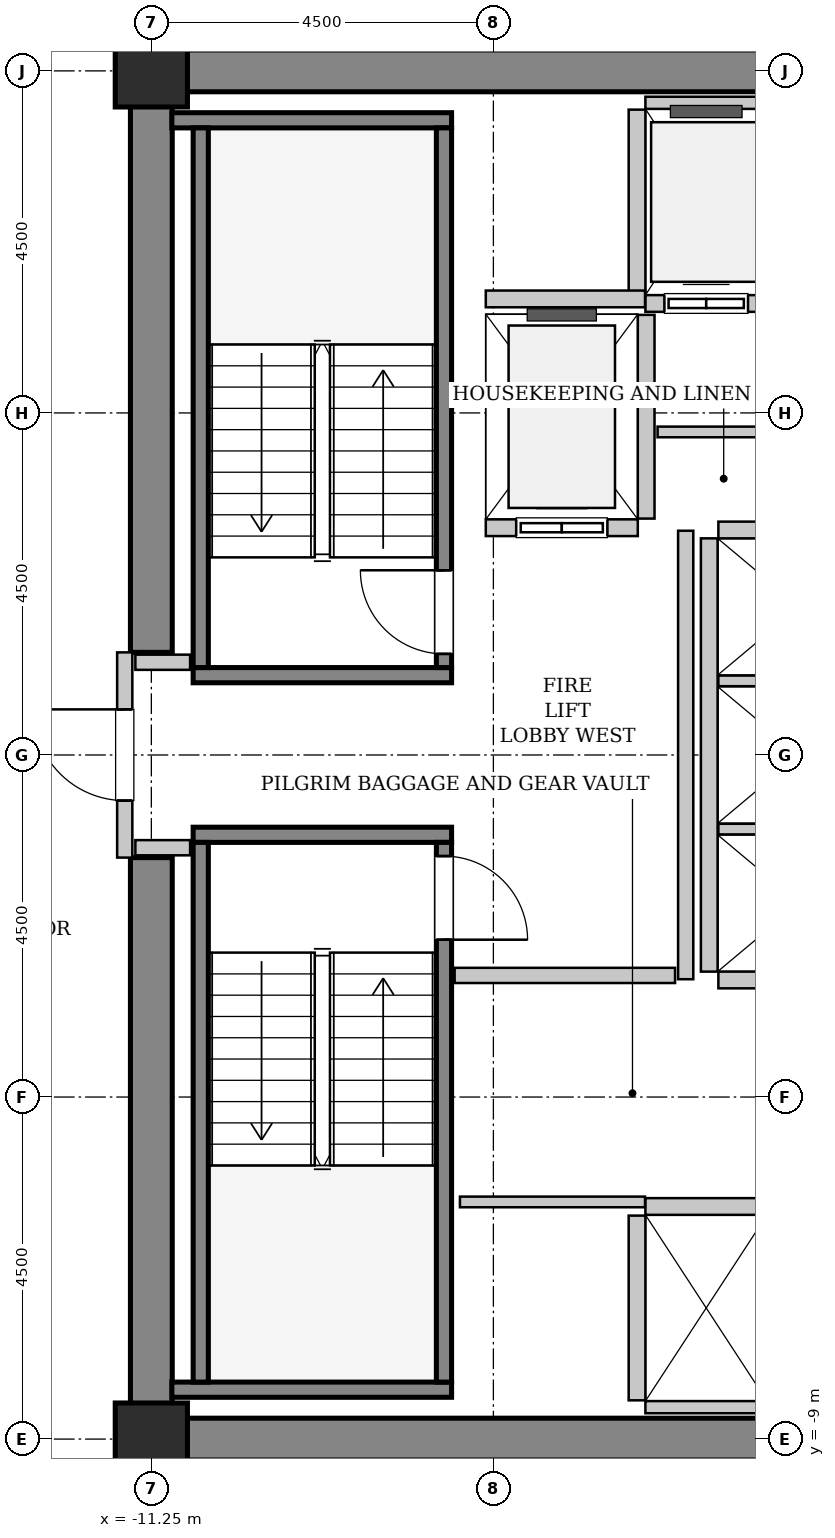
"""IFC4 building model, lengths in metres.
Left out: names, types, materials, properties, quantities, classifications, styles, units other than length and angle.
Written with IfcOpenShell. Run it as: python <this file> out.ifc"""

import sys

from ifc_helpers import new_model, si_unit, direction, frame, frame_2d, origin, origin_2d, place, context, subcontext, project, spatial, rectangle, hollow_rectangle, extrude, source, transform, mapped, element, fill, save


model = new_model("IFC4")
c1 = context("Model", 3, precision=1e-05, world=origin(), true_north=direction((0.0, 1.0)))
c2 = subcontext(c1, "Body", "Model", "MODEL_VIEW")
j1 = project(units=[si_unit("LENGTHUNIT", "METRE"), si_unit("PLANEANGLEUNIT", "RADIAN")], contexts=[c1])
p1 = place(None, origin())
s1 = spatial("IfcSite", under=j1, at=p1, CompositionType="ELEMENT")
p2 = place(p1, origin())
s2 = spatial("IfcBuilding", under=s1, at=p2, CompositionType="ELEMENT")
p3 = place(p2, frame((0.0, 0.0, 117.4)))
s3 = spatial("IfcBuildingStorey", under=s2, at=p3, CompositionType="ELEMENT", Elevation=117.4)
m1 = source(origin(), c2, "Body", "SweptSolid", [
    extrude(rectangle(XDim=9.975, YDim=0.55, at=frame_2d((4.987, 0.0))), origin(), (0.0, 0.0, 1.0), 3.8),
])
for number, where, z_axis, x_axis in (
    (1, (-11.525, 9.0, 0.0), (0.0, 0.0, 1.0), (1.0, 0.0, 0.0)),
    (2, (-11.525, -9.0, 0.0), (0.0, 0.0, 1.0), (1.0, 0.0, 0.0)),
):
    element("IfcWall", number, at=place(p3, frame(where, z_axis=z_axis, x_axis=x_axis)), inside=s3, PredefinedType="SHEAR", context=c2, shape_type="MappedRepresentation", body=[
        mapped(m1, transform((0.0, 0.0, 0.0), x_axis=(1.0, 0.0, 0.0), y_axis=(0.0, 1.0, 0.0), z_axis=(0.0, 0.0, 1.0), scale=1.0)),
    ])
m2 = source(origin(), c2, "Body", "SweptSolid", [
    extrude(rectangle(XDim=7.375, YDim=0.55, at=frame_2d((3.688, 0.0))), origin(), (0.0, 0.0, 1.0), 3.8),
])
for number, where, z_axis, x_axis in (
    (3, (-11.25, -8.725, 0.0), (0.0, 0.0, 1.0), (0.0, 1.0, 0.0)),
    (4, (-11.25, 1.35, 0.0), (0.0, 0.0, 1.0), (0.0, 1.0, 0.0)),
):
    element("IfcWall", number, at=place(p3, frame(where, z_axis=z_axis, x_axis=x_axis)), inside=s3, PredefinedType="SHEAR", context=c2, shape_type="MappedRepresentation", body=[
        mapped(m2, transform((0.0, 0.0, 0.0), x_axis=(1.0, 0.0, 0.0), y_axis=(0.0, 1.0, 0.0), z_axis=(0.0, 0.0, 1.0), scale=1.0)),
    ])
m3 = source(origin(), c2, "Body", "SweptSolid", [
    extrude(hollow_rectangle(XDim=0.95, YDim=0.95, WallThickness=0.045, InnerFilletRadius=0.045, OuterFilletRadius=0.09, at=origin_2d()), origin(), (0.0, 0.0, 1.0), 3.8),
])
for number, where, z_axis, x_axis in (
    (5, (-11.25, -9.0, 0.0), (0.0, 0.0, 1.0), (1.0, 0.0, 0.0)),
    (6, (-11.25, 9.0, 0.0), (0.0, 0.0, 1.0), (1.0, 0.0, 0.0)),
):
    element("IfcColumn", number, at=place(p3, frame(where, z_axis=z_axis, x_axis=x_axis)), inside=s3, PredefinedType="COLUMN", context=c2, shape_type="MappedRepresentation", body=[
        mapped(m3, transform((0.0, 0.0, 0.0), x_axis=(1.0, 0.0, 0.0), y_axis=(0.0, 1.0, 0.0), z_axis=(0.0, 0.0, 1.0), scale=1.0)),
    ])
m4 = source(origin(), c2, "Body", "SweptSolid", [
    extrude(rectangle(XDim=3.4, YDim=0.2, at=frame_2d((1.7, 0.0))), origin(), (0.0, 0.0, 1.0), 3.8),
])
p4 = place(p3, frame((-7.3, 1.05, 0.0), z_axis=(0.0, 0.0, 1.0), x_axis=(-1.0, 0.0, 0.0)))
e7 = element("IfcWall", 7, at=p4, inside=s3, PredefinedType="SOLIDWALL", context=c2, shape_type="MappedRepresentation", body=[
    mapped(m4, transform((0.0, 0.0, 0.0), x_axis=(1.0, 0.0, 0.0), y_axis=(0.0, 1.0, 0.0), z_axis=(0.0, 0.0, 1.0), scale=1.0)),
])
m5 = source(origin(), c2, "Body", "SweptSolid", [
    extrude(rectangle(XDim=3.68, YDim=0.2, at=frame_2d((1.84, 0.0))), origin(), (0.0, 0.0, 1.0), 3.8),
])
p5 = place(p3, frame((-7.3, 8.35, 0.0), z_axis=(0.0, 0.0, 1.0), x_axis=(-1.0, 0.0, 0.0)))
e8 = element("IfcWall", 8, at=p5, inside=s3, PredefinedType="SOLIDWALL", context=c2, shape_type="MappedRepresentation", body=[
    mapped(m5, transform((0.0, 0.0, 0.0), x_axis=(1.0, 0.0, 0.0), y_axis=(0.0, 1.0, 0.0), z_axis=(0.0, 0.0, 1.0), scale=1.0)),
])
m6 = source(origin(), c2, "Body", "SweptSolid", [
    extrude(rectangle(XDim=7.1, YDim=0.2, at=frame_2d((3.55, 0.0))), origin(), (0.0, 0.0, 1.0), 3.8),
])
p6 = place(p3, frame((-7.4, 1.15, 0.0), z_axis=(0.0, 0.0, 1.0), x_axis=(0.0, 1.0, 0.0)))
e9 = element("IfcWall", 9, at=p6, inside=s3, PredefinedType="SOLIDWALL", context=c2, shape_type="MappedRepresentation", body=[
    mapped(m6, transform((0.0, 0.0, 0.0), x_axis=(1.0, 0.0, 0.0), y_axis=(0.0, 1.0, 0.0), z_axis=(0.0, 0.0, 1.0), scale=1.0)),
])
p7 = place(p6, frame((0.18, 0.0, 0.0)))
e10 = element("IfcOpeningElement", 10, at=p7, cuts=e9, PredefinedType="OPENING", context=c2, shape_type="SweptSolid", body=[
    extrude(rectangle(XDim=1.1, YDim=2.15, at=frame_2d((0.55, 1.075))), frame((0.0, 0.11, 0.0), z_axis=(0.0, -1.0, 0.0), x_axis=(1.0, 0.0, 0.0)), (0.0, 0.0, 1.0), 0.22),
])
p8 = place(p3, frame((-10.6, 1.15, 0.0), z_axis=(0.0, 0.0, 1.0), x_axis=(0.0, 1.0, 0.0)))
e11 = element("IfcWall", 11, at=p8, inside=s3, PredefinedType="SOLIDWALL", context=c2, shape_type="MappedRepresentation", body=[
    mapped(m6, transform((0.0, 0.0, 0.0), x_axis=(1.0, 0.0, 0.0), y_axis=(0.0, 1.0, 0.0), z_axis=(0.0, 0.0, 1.0), scale=1.0)),
])
p9 = place(p3, frame((-10.7, -1.05, 0.0), z_axis=(0.0, 0.0, 1.0), x_axis=(1.0, 0.0, 0.0)))
e12 = element("IfcWall", 12, at=p9, inside=s3, PredefinedType="SOLIDWALL", context=c2, shape_type="MappedRepresentation", body=[
    mapped(m4, transform((0.0, 0.0, 0.0), x_axis=(1.0, 0.0, 0.0), y_axis=(0.0, 1.0, 0.0), z_axis=(0.0, 0.0, 1.0), scale=1.0)),
])
p10 = place(p3, frame((-10.98, -8.35, 0.0), z_axis=(0.0, 0.0, 1.0), x_axis=(1.0, 0.0, 0.0)))
e13 = element("IfcWall", 13, at=p10, inside=s3, PredefinedType="SOLIDWALL", context=c2, shape_type="MappedRepresentation", body=[
    mapped(m5, transform((0.0, 0.0, 0.0), x_axis=(1.0, 0.0, 0.0), y_axis=(0.0, 1.0, 0.0), z_axis=(0.0, 0.0, 1.0), scale=1.0)),
])
p11 = place(p3, frame((-10.6, -1.15, 0.0), z_axis=(0.0, 0.0, 1.0), x_axis=(0.0, -1.0, 0.0)))
e14 = element("IfcWall", 14, at=p11, inside=s3, PredefinedType="SOLIDWALL", context=c2, shape_type="MappedRepresentation", body=[
    mapped(m6, transform((0.0, 0.0, 0.0), x_axis=(1.0, 0.0, 0.0), y_axis=(0.0, 1.0, 0.0), z_axis=(0.0, 0.0, 1.0), scale=1.0)),
])
p12 = place(p3, frame((-7.4, -1.15, 0.0), z_axis=(0.0, 0.0, 1.0), x_axis=(0.0, -1.0, 0.0)))
e15 = element("IfcWall", 15, at=p12, inside=s3, PredefinedType="SOLIDWALL", context=c2, shape_type="MappedRepresentation", body=[
    mapped(m6, transform((0.0, 0.0, 0.0), x_axis=(1.0, 0.0, 0.0), y_axis=(0.0, 1.0, 0.0), z_axis=(0.0, 0.0, 1.0), scale=1.0)),
])
p13 = place(p12, frame((0.18, 0.0, 0.0)))
e16 = element("IfcOpeningElement", 16, at=p13, cuts=e15, PredefinedType="OPENING", context=c2, shape_type="SweptSolid", body=[
    extrude(rectangle(XDim=1.1, YDim=2.15, at=frame_2d((0.55, 1.075))), frame((0.0, 0.11, 0.0), z_axis=(0.0, -1.0, 0.0), x_axis=(1.0, 0.0, 0.0)), (0.0, 0.0, 1.0), 0.22),
])
m7 = source(origin(), c2, "Body", "SweptSolid", [
    extrude(rectangle(XDim=2.0, YDim=0.22, at=frame_2d((1.0, 0.0))), origin(), (0.0, 0.0, 1.0), 3.535),
])
p14 = place(p3, frame((-6.85, 2.99, 0.0), z_axis=(0.0, 0.0, 1.0), x_axis=(1.0, 0.0, 0.0)))
e17 = element("IfcWall", 17, at=p14, inside=s3, PredefinedType="SOLIDWALL", context=c2, shape_type="MappedRepresentation", body=[
    mapped(m7, transform((0.0, 0.0, 0.0), x_axis=(1.0, 0.0, 0.0), y_axis=(0.0, 1.0, 0.0), z_axis=(0.0, 0.0, 1.0), scale=1.0)),
])
p15 = place(p14, frame((0.4, 0.0, 0.0)))
e18 = element("IfcOpeningElement", 18, at=p15, cuts=e17, PredefinedType="OPENING", context=c2, shape_type="SweptSolid", body=[
    extrude(rectangle(XDim=1.2, YDim=2.2, at=frame_2d((0.6, 1.1))), frame((0.0, 0.12, 0.0), z_axis=(0.0, -1.0, 0.0), x_axis=(1.0, 0.0, 0.0)), (0.0, 0.0, 1.0), 0.24),
])
m8 = source(origin(), c2, "Body", "SweptSolid", [
    extrude(rectangle(XDim=2.68, YDim=0.22, at=frame_2d((1.34, 0.0))), origin(), (0.0, 0.0, 1.0), 3.535),
])
p16 = place(p3, frame((-4.74, 3.11, 0.0), z_axis=(0.0, 0.0, 1.0), x_axis=(0.0, 1.0, 0.0)))
e19 = element("IfcWall", 19, at=p16, inside=s3, PredefinedType="SOLIDWALL", context=c2, shape_type="MappedRepresentation", body=[
    mapped(m8, transform((0.0, 0.0, 0.0), x_axis=(1.0, 0.0, 0.0), y_axis=(0.0, 1.0, 0.0), z_axis=(0.0, 0.0, 1.0), scale=1.0)),
])
m9 = source(origin(), c2, "Body", "SweptSolid", [
    extrude(rectangle(XDim=3.2, YDim=0.22, at=frame_2d((1.6, 0.0))), origin(), (0.0, 0.0, 1.0), 3.535),
])
p17 = place(p3, frame((-4.75, 5.94, 0.0), z_axis=(0.0, 0.0, 1.0), x_axis=(1.0, 0.0, 0.0)))
e20 = element("IfcWall", 20, at=p17, inside=s3, PredefinedType="SOLIDWALL", context=c2, shape_type="MappedRepresentation", body=[
    mapped(m9, transform((0.0, 0.0, 0.0), x_axis=(1.0, 0.0, 0.0), y_axis=(0.0, 1.0, 0.0), z_axis=(0.0, 0.0, 1.0), scale=1.0)),
])
p18 = place(p17, frame((0.25, 0.0, 0.0)))
e21 = element("IfcOpeningElement", 21, at=p18, cuts=e20, PredefinedType="OPENING", context=c2, shape_type="SweptSolid", body=[
    extrude(rectangle(XDim=1.1, YDim=2.2, at=frame_2d((0.55, 1.1))), frame((0.0, 0.12, 0.0), z_axis=(0.0, -1.0, 0.0), x_axis=(1.0, 0.0, 0.0)), (0.0, 0.0, 1.0), 0.24),
])
p19 = place(p17, frame((1.875, 0.0, 0.0)))
e22 = element("IfcOpeningElement", 22, at=p19, cuts=e20, PredefinedType="OPENING", context=c2, shape_type="SweptSolid", body=[
    extrude(rectangle(XDim=1.1, YDim=2.2, at=frame_2d((0.55, 1.1))), frame((0.0, 0.12, 0.0), z_axis=(0.0, -1.0, 0.0), x_axis=(1.0, 0.0, 0.0)), (0.0, 0.0, 1.0), 0.24),
])
m10 = source(origin(), c2, "Body", "SweptSolid", [
    extrude(rectangle(XDim=3.2, YDim=0.16, at=frame_2d((1.6, 0.0))), origin(), (0.0, 0.0, 1.0), 2.425),
])
p20 = place(p3, frame((-1.55, 8.58, 0.0), z_axis=(0.0, 0.0, 1.0), x_axis=(-1.0, 0.0, 0.0)))
e23 = element("IfcWall", 23, at=p20, inside=s3, PredefinedType="PARTITIONING", context=c2, shape_type="MappedRepresentation", body=[
    mapped(m10, transform((0.0, 0.0, 0.0), x_axis=(1.0, 0.0, 0.0), y_axis=(0.0, 1.0, 0.0), z_axis=(0.0, 0.0, 1.0), scale=1.0)),
])
m11 = source(origin(), c2, "Body", "SweptSolid", [
    extrude(rectangle(XDim=2.43, YDim=0.22, at=frame_2d((1.215, 0.0))), origin(), (0.0, 0.0, 1.0), 3.535),
])
p21 = place(p3, frame((-4.86, 8.49, 0.0), z_axis=(0.0, 0.0, 1.0), x_axis=(0.0, -1.0, 0.0)))
e24 = element("IfcWall", 24, at=p21, inside=s3, PredefinedType="SOLIDWALL", context=c2, shape_type="MappedRepresentation", body=[
    mapped(m11, transform((0.0, 0.0, 0.0), x_axis=(1.0, 0.0, 0.0), y_axis=(0.0, 1.0, 0.0), z_axis=(0.0, 0.0, 1.0), scale=1.0)),
])
p22 = place(p3, frame((-1.55, -5.94, 0.0), z_axis=(0.0, 0.0, 1.0), x_axis=(-1.0, 0.0, 0.0)))
e25 = element("IfcWall", 25, at=p22, inside=s3, PredefinedType="SOLIDWALL", context=c2, shape_type="MappedRepresentation", body=[
    mapped(m9, transform((0.0, 0.0, 0.0), x_axis=(1.0, 0.0, 0.0), y_axis=(0.0, 1.0, 0.0), z_axis=(0.0, 0.0, 1.0), scale=1.0)),
])
p23 = place(p3, frame((-4.75, -8.58, 0.0), z_axis=(0.0, 0.0, 1.0), x_axis=(1.0, 0.0, 0.0)))
e26 = element("IfcWall", 26, at=p23, inside=s3, PredefinedType="PARTITIONING", context=c2, shape_type="MappedRepresentation", body=[
    mapped(m10, transform((0.0, 0.0, 0.0), x_axis=(1.0, 0.0, 0.0), y_axis=(0.0, 1.0, 0.0), z_axis=(0.0, 0.0, 1.0), scale=1.0)),
])
p24 = place(p3, frame((-4.86, -6.06, 0.0), z_axis=(0.0, 0.0, 1.0), x_axis=(0.0, -1.0, 0.0)))
e27 = element("IfcWall", 27, at=p24, inside=s3, PredefinedType="SOLIDWALL", context=c2, shape_type="MappedRepresentation", body=[
    mapped(m11, transform((0.0, 0.0, 0.0), x_axis=(1.0, 0.0, 0.0), y_axis=(0.0, 1.0, 0.0), z_axis=(0.0, 0.0, 1.0), scale=1.0)),
])
m12 = source(origin(), c2, "Body", "SweptSolid", [
    extrude(rectangle(XDim=5.7, YDim=0.22, at=frame_2d((2.85, 0.0))), origin(), (0.0, 0.0, 1.0), 3.535),
])
p25 = place(p3, frame((-3.91, 2.85, 0.0), z_axis=(0.0, 0.0, 1.0), x_axis=(0.0, -1.0, 0.0)))
e28 = element("IfcWall", 28, at=p25, inside=s3, PredefinedType="SOLIDWALL", context=c2, shape_type="MappedRepresentation", body=[
    mapped(m12, transform((0.0, 0.0, 0.0), x_axis=(1.0, 0.0, 0.0), y_axis=(0.0, 1.0, 0.0), z_axis=(0.0, 0.0, 1.0), scale=1.0)),
])
m13 = source(origin(), c2, "Body", "SweptSolid", [
    extrude(rectangle(XDim=2.13, YDim=0.22, at=frame_2d((1.065, 0.0))), origin(), (0.0, 0.0, 1.0), 3.535),
])
p26 = place(p3, frame((-3.79, -2.96, 0.0), z_axis=(0.0, 0.0, 1.0), x_axis=(1.0, 0.0, 0.0)))
e29 = element("IfcWall", 29, at=p26, inside=s3, PredefinedType="SOLIDWALL", context=c2, shape_type="MappedRepresentation", body=[
    mapped(m13, transform((0.0, 0.0, 0.0), x_axis=(1.0, 0.0, 0.0), y_axis=(0.0, 1.0, 0.0), z_axis=(0.0, 0.0, 1.0), scale=1.0)),
])
m14 = source(origin(), c2, "Body", "SweptSolid", [
    extrude(rectangle(XDim=2.13, YDim=0.14, at=frame_2d((1.065, 0.0))), origin(), (0.0, 0.0, 1.0), 3.535),
])
for number, where, z_axis, x_axis in (
    (30, (-3.79, -0.975, 0.0), (0.0, 0.0, 1.0), (1.0, 0.0, 0.0)),
    (31, (-3.79, 0.975, 0.0), (0.0, 0.0, 1.0), (1.0, 0.0, 0.0)),
):
    element("IfcWall", number, at=place(p3, frame(where, z_axis=z_axis, x_axis=x_axis)), inside=s3, PredefinedType="PARTITIONING", context=c2, shape_type="MappedRepresentation", body=[
        mapped(m14, transform((0.0, 0.0, 0.0), x_axis=(1.0, 0.0, 0.0), y_axis=(0.0, 1.0, 0.0), z_axis=(0.0, 0.0, 1.0), scale=1.0)),
    ])
p27 = place(p3, frame((-1.66, 2.96, 0.0), z_axis=(0.0, 0.0, 1.0), x_axis=(-1.0, 0.0, 0.0)))
e32 = element("IfcWall", 32, at=p27, inside=s3, PredefinedType="SOLIDWALL", context=c2, shape_type="MappedRepresentation", body=[
    mapped(m13, transform((0.0, 0.0, 0.0), x_axis=(1.0, 0.0, 0.0), y_axis=(0.0, 1.0, 0.0), z_axis=(0.0, 0.0, 1.0), scale=1.0)),
])
m15 = source(origin(), c2, "Body", "SweptSolid", [
    extrude(rectangle(XDim=2.095, YDim=0.22, at=frame_2d((1.048, 0.0))), origin(), (0.0, 0.0, 1.0), 3.535),
])
p28 = place(p3, frame((-6.85, 6.0, 0.0), z_axis=(0.0, 0.0, 1.0), x_axis=(1.0, 0.0, 0.0)))
e33 = element("IfcWall", 33, at=p28, inside=s3, PredefinedType="SOLIDWALL", context=c2, shape_type="MappedRepresentation", body=[
    mapped(m15, transform((0.0, 0.0, 0.0), x_axis=(1.0, 0.0, 0.0), y_axis=(0.0, 1.0, 0.0), z_axis=(0.0, 0.0, 1.0), scale=1.0)),
])
m16 = source(origin(), c2, "Body", "SweptSolid", [
    extrude(rectangle(XDim=2.7, YDim=0.2, at=frame_2d((1.35, 0.0))), origin(), (0.0, 0.0, 1.0), 2.425),
])
p29 = place(p3, frame((-11.6, -1.35, 0.0), z_axis=(0.0, 0.0, 1.0), x_axis=(0.0, 1.0, 0.0)))
e34 = element("IfcWall", 34, at=p29, inside=s3, PredefinedType="PARTITIONING", context=c2, shape_type="MappedRepresentation", body=[
    mapped(m16, transform((0.0, 0.0, 0.0), x_axis=(1.0, 0.0, 0.0), y_axis=(0.0, 1.0, 0.0), z_axis=(0.0, 0.0, 1.0), scale=1.0)),
])
p30 = place(p29, frame((0.75, 0.0, 0.0)))
e35 = element("IfcOpeningElement", 35, at=p30, cuts=e34, PredefinedType="OPENING", context=c2, shape_type="SweptSolid", body=[
    extrude(rectangle(XDim=1.2, YDim=2.15, at=frame_2d((0.6, 1.075))), frame((0.0, 0.11, 0.0), z_axis=(0.0, -1.0, 0.0), x_axis=(1.0, 0.0, 0.0)), (0.0, 0.0, 1.0), 0.22),
])
m17 = source(origin(), c2, "Body", "SweptSolid", [
    extrude(rectangle(XDim=5.9, YDim=0.2, at=frame_2d((2.95, 0.0))), origin(), (0.0, 0.0, 1.0), 3.535),
])
p31 = place(p3, frame((-4.22, -2.95, 0.0), z_axis=(0.0, 0.0, 1.0), x_axis=(0.0, 1.0, 0.0)))
e36 = element("IfcWall", 36, at=p31, inside=s3, PredefinedType="PARTITIONING", context=c2, shape_type="MappedRepresentation", body=[
    mapped(m17, transform((0.0, 0.0, 0.0), x_axis=(1.0, 0.0, 0.0), y_axis=(0.0, 1.0, 0.0), z_axis=(0.0, 0.0, 1.0), scale=1.0)),
])
m18 = source(origin(), c2, "Body", "SweptSolid", [
    extrude(rectangle(XDim=2.9, YDim=0.2, at=frame_2d((1.45, 0.0))), origin(), (0.0, 0.0, 1.0), 3.535),
])
p32 = place(p3, frame((-7.26, -2.9, 0.0), z_axis=(0.0, 0.0, 1.0), x_axis=(1.0, 0.0, 0.0)))
e37 = element("IfcWall", 37, at=p32, inside=s3, PredefinedType="PARTITIONING", context=c2, shape_type="MappedRepresentation", body=[
    mapped(m18, transform((0.0, 0.0, 0.0), x_axis=(1.0, 0.0, 0.0), y_axis=(0.0, 1.0, 0.0), z_axis=(0.0, 0.0, 1.0), scale=1.0)),
])
m19 = source(origin(), c2, "Body", "SweptSolid", [
    extrude(rectangle(XDim=0.72, YDim=0.2, at=frame_2d((0.36, 0.0))), origin(), (0.0, 0.0, 1.0), 3.535),
])
for number, where, z_axis, x_axis in (
    (38, (-11.46, 1.22, 0.0), (0.0, 0.0, 1.0), (1.0, 0.0, 0.0)),
    (39, (-11.46, -1.22, 0.0), (0.0, 0.0, 1.0), (1.0, 0.0, 0.0)),
):
    element("IfcWall", number, at=place(p3, frame(where, z_axis=z_axis, x_axis=x_axis)), inside=s3, PredefinedType="PARTITIONING", context=c2, shape_type="MappedRepresentation", body=[
        mapped(m19, transform((0.0, 0.0, 0.0), x_axis=(1.0, 0.0, 0.0), y_axis=(0.0, 1.0, 0.0), z_axis=(0.0, 0.0, 1.0), scale=1.0)),
    ])
m20 = source(origin(), c2, "Body", "SweptSolid", [
    extrude(rectangle(XDim=2.95, YDim=0.14, at=frame_2d((1.475, 0.0))), origin(), (0.0, 0.0, 1.0), 3.535),
])
p33 = place(p3, frame((-4.59, 4.25, 0.0), z_axis=(0.0, 0.0, 1.0), x_axis=(1.0, 0.0, 0.0)))
e40 = element("IfcWall", 40, at=p33, inside=s3, PredefinedType="PARTITIONING", context=c2, shape_type="MappedRepresentation", body=[
    mapped(m20, transform((0.0, 0.0, 0.0), x_axis=(1.0, 0.0, 0.0), y_axis=(0.0, 1.0, 0.0), z_axis=(0.0, 0.0, 1.0), scale=1.0)),
])
m21 = source(origin(), c2, "Body", "SweptSolid", [
    extrude(rectangle(XDim=2.435, YDim=0.14, at=frame_2d((1.218, 0.0))), origin(), (0.0, 0.0, 1.0), 3.535),
])
p34 = place(p3, frame((-7.19, -5.88, 0.0), z_axis=(0.0, 0.0, 1.0), x_axis=(1.0, 0.0, 0.0)))
e41 = element("IfcWall", 41, at=p34, inside=s3, PredefinedType="PARTITIONING", context=c2, shape_type="MappedRepresentation", body=[
    mapped(m21, transform((0.0, 0.0, 0.0), x_axis=(1.0, 0.0, 0.0), y_axis=(0.0, 1.0, 0.0), z_axis=(0.0, 0.0, 1.0), scale=1.0)),
])
m22 = source(origin(), c2, "Body", "SweptSolid", [
    extrude(rectangle(XDim=1.1, YDim=2.15, at=frame_2d((0.55, 1.075))), frame((0.0, 0.025, 0.0), z_axis=(0.0, -1.0, 0.0), x_axis=(1.0, 0.0, 0.0)), (0.0, 0.0, 1.0), 0.05),
])
p35 = place(p7, origin())
e42 = element("IfcDoor", 42, at=p35, inside=s3, OperationType="SINGLE_SWING_RIGHT", PredefinedType="DOOR", context=c2, shape_type="MappedRepresentation", body=[
    mapped(m22, transform((0.0, 0.0, 0.0), x_axis=(1.0, 0.0, 0.0), y_axis=(0.0, 1.0, 0.0), z_axis=(0.0, 0.0, 1.0), scale=1.0)),
])
fill(e10, e42)
p36 = place(p13, origin())
e43 = element("IfcDoor", 43, at=p36, inside=s3, OperationType="SINGLE_SWING_RIGHT", PredefinedType="DOOR", context=c2, shape_type="MappedRepresentation", body=[
    mapped(m22, transform((0.0, 0.0, 0.0), x_axis=(1.0, 0.0, 0.0), y_axis=(0.0, 1.0, 0.0), z_axis=(0.0, 0.0, 1.0), scale=1.0)),
])
fill(e16, e43)
m23 = source(origin(), c2, "Body", "SweptSolid", [
    extrude(rectangle(XDim=1.2, YDim=2.2, at=frame_2d((0.6, 1.1))), frame((0.0, 0.025, 0.0), z_axis=(0.0, -1.0, 0.0), x_axis=(1.0, 0.0, 0.0)), (0.0, 0.0, 1.0), 0.05),
])
p37 = place(p15, origin())
e44 = element("IfcDoor", 44, at=p37, inside=s3, OperationType="SLIDING_TO_LEFT", PredefinedType="DOOR", context=c2, shape_type="MappedRepresentation", body=[
    mapped(m23, transform((0.0, 0.0, 0.0), x_axis=(1.0, 0.0, 0.0), y_axis=(0.0, 1.0, 0.0), z_axis=(0.0, 0.0, 1.0), scale=1.0)),
])
fill(e18, e44)
m24 = source(origin(), c2, "Body", "SweptSolid", [
    extrude(rectangle(XDim=1.1, YDim=2.2, at=frame_2d((0.55, 1.1))), frame((0.0, 0.025, 0.0), z_axis=(0.0, -1.0, 0.0), x_axis=(1.0, 0.0, 0.0)), (0.0, 0.0, 1.0), 0.05),
])
p38 = place(p18, origin())
e45 = element("IfcDoor", 45, at=p38, inside=s3, OperationType="DOUBLE_DOOR_SLIDING", PredefinedType="DOOR", context=c2, shape_type="MappedRepresentation", body=[
    mapped(m24, transform((0.0, 0.0, 0.0), x_axis=(1.0, 0.0, 0.0), y_axis=(0.0, 1.0, 0.0), z_axis=(0.0, 0.0, 1.0), scale=1.0)),
])
fill(e21, e45)
m25 = source(origin(), c2, "Body", "SweptSolid", [
    extrude(rectangle(XDim=1.2, YDim=2.15, at=frame_2d((0.6, 1.075))), frame((0.0, 0.025, 0.0), z_axis=(0.0, -1.0, 0.0), x_axis=(1.0, 0.0, 0.0)), (0.0, 0.0, 1.0), 0.05),
])
p39 = place(p30, origin())
e46 = element("IfcDoor", 46, at=p39, inside=s3, OperationType="SINGLE_SWING_RIGHT", PredefinedType="DOOR", context=c2, shape_type="MappedRepresentation", body=[
    mapped(m25, transform((0.0, 0.0, 0.0), x_axis=(1.0, 0.0, 0.0), y_axis=(0.0, 1.0, 0.0), z_axis=(0.0, 0.0, 1.0), scale=1.0)),
])
fill(e35, e46)
save(model, sys.argv[1])
